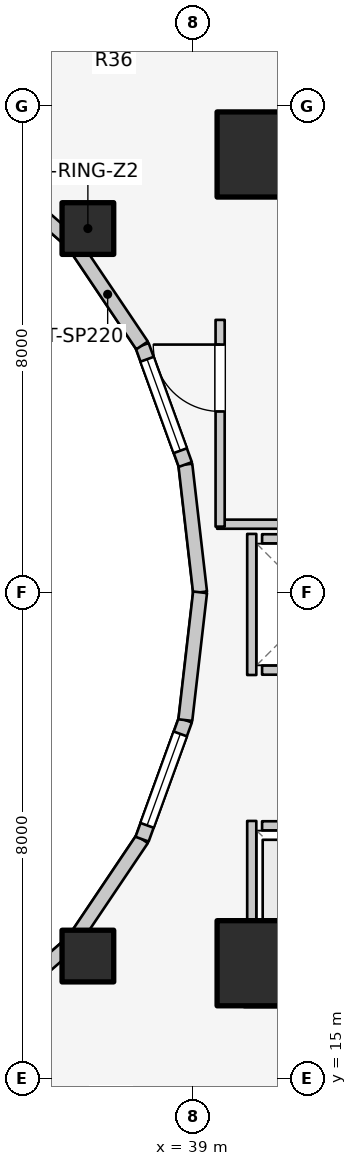
"""IFC4 building model, lengths in metres.
Left out: names, types, materials, properties, quantities, classifications, styles, units other than length and angle.
Written with IfcOpenShell. Run it as: python <this file> out.ifc"""

import sys

from ifc_helpers import new_model, si_unit, direction, frame, frame_2d, origin, origin_2d, place, context, subcontext, project, spatial, rectangle, extrude, element, fill, save


model = new_model("IFC4")
c1 = context("Model", 3, precision=1e-05, world=origin(), true_north=direction((0.0, 1.0)))
c2 = subcontext(c1, "Body", "Model", "MODEL_VIEW")
j1 = project(units=[si_unit("LENGTHUNIT", "METRE"), si_unit("PLANEANGLEUNIT", "RADIAN")], contexts=[c1])
p1 = place(None, origin())
s1 = spatial("IfcSite", under=j1, at=p1, CompositionType="ELEMENT")
p2 = place(p1, origin())
s2 = spatial("IfcBuilding", under=s1, at=p2, CompositionType="ELEMENT")
p3 = place(p2, frame((0.0, 0.0, 85.6)))
s3 = spatial("IfcBuildingStorey", under=s2, at=p3, CompositionType="ELEMENT", Elevation=85.6)
for number, where, z_axis, x_axis in (
    (1, (39.85, 16.55, 0.0), (0.0, 0.0, 1.0), (1.0, 0.0, 0.0)),
    (2, (39.85, 30.35, 0.0), (0.0, 0.0, 1.0), (1.0, 0.0, 0.0)),
):
    element("IfcWall", number, at=place(p3, frame(where, z_axis=z_axis, x_axis=x_axis)), inside=s3, PredefinedType="SHEAR", context=c2, shape_type="SweptSolid", body=[
        extrude(rectangle(XDim=4.5, YDim=0.7, at=frame_2d((2.25, 0.0))), origin(), (0.0, 0.0, 1.0), 3.1),
    ])
for number, where, z_axis, x_axis in (
    (3, (40.1, 16.9, 0.0), (0.0, 0.0, 1.0), (1.0, 0.0, 0.0)),
    (4, (40.1, 30.2, 0.0), (0.0, 0.0, 1.0), (1.0, 0.0, 0.0)),
):
    element("IfcColumn", number, at=place(p3, frame(where, z_axis=z_axis, x_axis=x_axis)), inside=s3, PredefinedType="COLUMN", context=c2, shape_type="SweptSolid", body=[
        extrude(rectangle(XDim=1.4, YDim=1.4, at=origin_2d()), origin(), (0.0, 0.0, 1.0), 3.1),
    ])
for number, where, z_axis, x_axis in (
    (5, (37.275, 28.982, 0.0), (0.0, 0.0, 1.0), (1.0, 0.0, 0.0)),
    (6, (37.275, 17.018, 0.0), (0.0, 0.0, 1.0), (1.0, 0.0, 0.0)),
):
    element("IfcColumn", number, at=place(p3, frame(where, z_axis=z_axis, x_axis=x_axis)), inside=s3, PredefinedType="COLUMN", context=c2, shape_type="SweptSolid", body=[
        extrude(rectangle(XDim=0.85, YDim=0.85, at=origin_2d()), origin(), (0.0, 0.0, 1.0), 3.1),
    ])
p4 = place(p3, frame((39.12, 23.0, 0.0), z_axis=(0.0, 0.0, 1.0), x_axis=(-0.114711713601, 0.993398823617, 0.0)))
e7 = element("IfcWall", 7, at=p4, inside=s3, PredefinedType="STANDARD", context=c2, shape_type="SweptSolid", body=[
    extrude(rectangle(XDim=2.115, YDim=0.23, at=frame_2d((1.058, 0.0))), origin(), (0.0, 0.0, 1.0), 2.84),
])
p5 = place(p3, frame((38.877, 25.102, 0.0), z_axis=(0.0, 0.0, 1.0), x_axis=(-0.341423187295, 0.93990968033, 0.0)))
e8 = element("IfcWall", 8, at=p5, inside=s3, PredefinedType="STANDARD", context=c2, shape_type="SweptSolid", body=[
    extrude(rectangle(XDim=2.084, YDim=0.23, at=frame_2d((1.042, 0.0))), origin(), (0.0, 0.0, 1.0), 2.84),
])
p6 = place(p5, frame((0.242, 0.0, 0.85)))
e9 = element("IfcOpeningElement", 9, at=p6, cuts=e8, PredefinedType="OPENING", context=c2, shape_type="SweptSolid", body=[
    extrude(rectangle(XDim=1.6, YDim=1.65, at=frame_2d((0.8, 0.825))), frame((0.0, 0.125, 0.0), z_axis=(0.0, -1.0, 0.0), x_axis=(1.0, 0.0, 0.0)), (0.0, 0.0, 1.0), 0.25),
])
p7 = place(p3, frame((38.166, 27.06, 0.0), z_axis=(0.0, 0.0, 1.0), x_axis=(-0.558197800898, 0.829707909492, 0.0)))
e10 = element("IfcWall", 10, at=p7, inside=s3, PredefinedType="STANDARD", context=c2, shape_type="SweptSolid", body=[
    extrude(rectangle(XDim=2.027, YDim=0.23, at=frame_2d((1.013, 0.0))), origin(), (0.0, 0.0, 1.0), 2.16),
])
for number, where, z_axis, x_axis in (
    (11, (37.035, 28.742, 0.0), (0.0, 0.0, 1.0), (-0.753, 0.659, 0.0)),
    (12, (35.56, 15.968, 0.0), (0.0, 0.0, 1.0), (0.753, 0.659, 0.0)),
):
    element("IfcWall", number, at=place(p3, frame(where, z_axis=z_axis, x_axis=x_axis)), inside=s3, PredefinedType="STANDARD", context=c2, shape_type="SweptSolid", body=[
        extrude(rectangle(XDim=1.959, YDim=0.23, at=frame_2d((0.98, 0.0))), origin(), (0.0, 0.0, 1.0), 2.16),
    ])
p8 = place(p3, frame((37.035, 17.258, 0.0), z_axis=(0.0, 0.0, 1.0), x_axis=(0.558197800898, 0.829707909492, 0.0)))
e13 = element("IfcWall", 13, at=p8, inside=s3, PredefinedType="STANDARD", context=c2, shape_type="SweptSolid", body=[
    extrude(rectangle(XDim=2.027, YDim=0.23, at=frame_2d((1.013, 0.0))), origin(), (0.0, 0.0, 1.0), 2.16),
])
p9 = place(p3, frame((38.166, 18.94, 0.0), z_axis=(0.0, 0.0, 1.0), x_axis=(0.341423187295, 0.93990968033, 0.0)))
e14 = element("IfcWall", 14, at=p9, inside=s3, PredefinedType="STANDARD", context=c2, shape_type="SweptSolid", body=[
    extrude(rectangle(XDim=2.084, YDim=0.23, at=frame_2d((1.042, 0.0))), origin(), (0.0, 0.0, 1.0), 2.84),
])
p10 = place(p9, frame((0.242, 0.0, 0.85)))
e15 = element("IfcOpeningElement", 15, at=p10, cuts=e14, PredefinedType="OPENING", context=c2, shape_type="SweptSolid", body=[
    extrude(rectangle(XDim=1.6, YDim=1.65, at=frame_2d((0.8, 0.825))), frame((0.0, 0.125, 0.0), z_axis=(0.0, -1.0, 0.0), x_axis=(1.0, 0.0, 0.0)), (0.0, 0.0, 1.0), 0.25),
])
p11 = place(p3, frame((38.877, 20.898, 0.0), z_axis=(0.0, 0.0, 1.0), x_axis=(0.114711713601, 0.993398823617, 0.0)))
e16 = element("IfcWall", 16, at=p11, inside=s3, PredefinedType="STANDARD", context=c2, shape_type="SweptSolid", body=[
    extrude(rectangle(XDim=2.115, YDim=0.23, at=frame_2d((1.058, 0.0))), origin(), (0.0, 0.0, 1.0), 2.84),
])
p12 = place(p3, frame((40.14, 19.16, 0.0), z_axis=(0.0, 0.0, 1.0), x_axis=(1.0, 0.0, 0.0)))
e17 = element("IfcWall", 17, at=p12, inside=s3, PredefinedType="SOLIDWALL", context=c2, shape_type="SweptSolid", body=[
    extrude(rectangle(XDim=1.82, YDim=0.15, at=frame_2d((0.91, 0.0))), origin(), (0.0, 0.0, 1.0), 2.12),
])
p13 = place(p12, frame((0.36, 0.0, 0.0)))
e18 = element("IfcOpeningElement", 18, at=p13, cuts=e17, PredefinedType="OPENING", context=c2, shape_type="SweptSolid", body=[
    extrude(rectangle(XDim=1.1, YDim=2.1, at=frame_2d((0.55, 1.05))), frame((0.0, 0.085, 0.0), z_axis=(0.0, -1.0, 0.0), x_axis=(1.0, 0.0, 0.0)), (0.0, 0.0, 1.0), 0.17),
])
p14 = place(p3, frame((40.14, 17.1, 0.0), z_axis=(0.0, 0.0, 1.0), x_axis=(1.0, 0.0, 0.0)))
e19 = element("IfcWall", 19, at=p14, inside=s3, PredefinedType="SOLIDWALL", context=c2, shape_type="SweptSolid", body=[
    extrude(rectangle(XDim=1.82, YDim=0.15, at=frame_2d((0.91, 0.0))), origin(), (0.0, 0.0, 1.0), 2.12),
])
p15 = place(p3, frame((39.97, 17.02, 0.0), z_axis=(0.0, 0.0, 1.0), x_axis=(0.0, 1.0, 0.0)))
e20 = element("IfcWall", 20, at=p15, inside=s3, PredefinedType="SOLIDWALL", context=c2, shape_type="SweptSolid", body=[
    extrude(rectangle(XDim=2.22, YDim=0.15, at=frame_2d((1.11, 0.0))), origin(), (0.0, 0.0, 1.0), 2.12),
])
for number, where, z_axis, x_axis in (
    (21, (40.14, 21.72, 0.0), (0.0, 0.0, 1.0), (1.0, 0.0, 0.0)),
    (22, (40.14, 23.88, 0.0), (0.0, 0.0, 1.0), (1.0, 0.0, 0.0)),
):
    element("IfcWall", number, at=place(p3, frame(where, z_axis=z_axis, x_axis=x_axis)), inside=s3, PredefinedType="SOLIDWALL", context=c2, shape_type="SweptSolid", body=[
        extrude(rectangle(XDim=1.82, YDim=0.15, at=frame_2d((0.91, 0.0))), origin(), (0.0, 0.0, 1.0), 2.12),
    ])
p16 = place(p3, frame((39.97, 21.64, 0.0), z_axis=(0.0, 0.0, 1.0), x_axis=(0.0, 1.0, 0.0)))
e23 = element("IfcWall", 23, at=p16, inside=s3, PredefinedType="SOLIDWALL", context=c2, shape_type="SweptSolid", body=[
    extrude(rectangle(XDim=2.32, YDim=0.15, at=frame_2d((1.16, 0.0))), origin(), (0.0, 0.0, 1.0), 2.12),
])
p17 = place(p3, frame((39.4, 24.12, 0.0), z_axis=(0.0, 0.0, 1.0), x_axis=(1.0, 0.0, 0.0)))
e24 = element("IfcWall", 24, at=p17, inside=s3, PredefinedType="PARTITIONING", context=c2, shape_type="SweptSolid", body=[
    extrude(rectangle(XDim=5.08, YDim=0.15, at=frame_2d((2.54, 0.0))), origin(), (0.0, 0.0, 1.0), 2.12),
])
p18 = place(p3, frame((39.45, 24.08, 0.0), z_axis=(0.0, 0.0, 1.0), x_axis=(0.0, 1.0, 0.0)))
e25 = element("IfcWall", 25, at=p18, inside=s3, PredefinedType="PARTITIONING", context=c2, shape_type="SweptSolid", body=[
    extrude(rectangle(XDim=3.4, YDim=0.15, at=frame_2d((1.7, 0.0))), origin(), (0.0, 0.0, 1.0), 2.855),
])
p19 = place(p18, frame((1.894, 0.0, 0.0)))
e26 = element("IfcOpeningElement", 26, at=p19, cuts=e25, PredefinedType="OPENING", context=c2, shape_type="SweptSolid", body=[
    extrude(rectangle(XDim=1.1, YDim=2.1, at=frame_2d((0.55, 1.05))), frame((0.0, 0.085, 0.0), z_axis=(0.0, -1.0, 0.0), x_axis=(1.0, 0.0, 0.0)), (0.0, 0.0, 1.0), 0.17),
])
p20 = place(p6, origin())
e27 = element("IfcWindow", 27, at=p20, inside=s3, PartitioningType="SINGLE_PANEL", PredefinedType="WINDOW", context=c2, shape_type="SweptSolid", body=[
    extrude(rectangle(XDim=1.6, YDim=1.65, at=frame_2d((0.8, 0.825))), frame((0.0, 0.03, 0.0), z_axis=(0.0, -1.0, 0.0), x_axis=(1.0, 0.0, 0.0)), (0.0, 0.0, 1.0), 0.06),
])
fill(e9, e27)
p21 = place(p10, origin())
e28 = element("IfcWindow", 28, at=p21, inside=s3, PartitioningType="SINGLE_PANEL", PredefinedType="WINDOW", context=c2, shape_type="SweptSolid", body=[
    extrude(rectangle(XDim=1.6, YDim=1.65, at=frame_2d((0.8, 0.825))), frame((0.0, 0.03, 0.0), z_axis=(0.0, -1.0, 0.0), x_axis=(1.0, 0.0, 0.0)), (0.0, 0.0, 1.0), 0.06),
])
fill(e15, e28)
p22 = place(p19, origin())
e29 = element("IfcDoor", 29, at=p22, inside=s3, OperationType="SINGLE_SWING_RIGHT", PredefinedType="DOOR", context=c2, shape_type="SweptSolid", body=[
    extrude(rectangle(XDim=1.1, YDim=2.1, at=frame_2d((0.55, 1.05))), frame((0.0, 0.025, 0.0), z_axis=(0.0, -1.0, 0.0), x_axis=(1.0, 0.0, 0.0)), (0.0, 0.0, 1.0), 0.05),
])
fill(e26, e29)
save(model, sys.argv[1])
